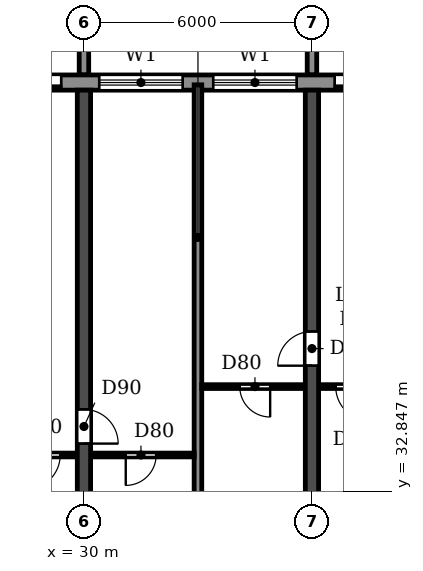
"""IFC4 building model, lengths in metres.
Left out: names, types, materials, properties, quantities, classifications, styles, units other than length and angle.
Written with IfcOpenShell. Run it as: python <this file> out.ifc"""

import sys

from ifc_helpers import new_model, si_unit, direction, frame, frame_2d, origin, place, context, subcontext, project, spatial, polyline, rectangle, outline, extrude, source, transform, mapped, element, fill, save


model = new_model("IFC4")
c1 = context("Model", 3, precision=1e-05, world=origin(), true_north=direction((0.0, 1.0)))
c2 = subcontext(c1, "Body", "Model", "MODEL_VIEW")
j1 = project(units=[si_unit("LENGTHUNIT", "METRE"), si_unit("PLANEANGLEUNIT", "RADIAN")], contexts=[c1])
p1 = place(None, origin())
s1 = spatial("IfcSite", under=j1, at=p1, CompositionType="ELEMENT")
p2 = place(p1, origin())
s2 = spatial("IfcBuilding", under=s1, at=p2, CompositionType="ELEMENT")
p3 = place(p2, frame((0.0, 0.0, 92.7)))
s3 = spatial("IfcBuildingStorey", under=s2, at=p3, CompositionType="ELEMENT", Elevation=92.7)
p4 = place(p3, frame((30.0, 30.525, 0.0), z_axis=(0.0, 0.0, 1.0), x_axis=(0.0, 1.0, 0.0)))
e1 = element("IfcWall", 1, at=p4, inside=s3, PredefinedType="SHEAR", context=c2, shape_type="SweptSolid", body=[
    extrude(rectangle(XDim=12.875, YDim=0.35, at=frame_2d((6.438, 0.0))), origin(), (0.0, 0.0, 1.0), 3.06),
])
p5 = place(p4, frame((3.575, 0.0, 0.0)))
e2 = element("IfcOpeningElement", 2, at=p5, cuts=e1, PredefinedType="OPENING", context=c2, shape_type="SweptSolid", body=[
    extrude(rectangle(XDim=0.9, YDim=2.1, at=frame_2d((0.45, 1.05))), frame((0.0, 0.185, 0.0), z_axis=(0.0, -1.0, 0.0), x_axis=(1.0, 0.0, 0.0)), (0.0, 0.0, 1.0), 0.37),
])
p6 = place(p3, frame((36.0, 30.525, 0.0), z_axis=(0.0, 0.0, 1.0), x_axis=(0.0, 1.0, 0.0)))
e3 = element("IfcWall", 3, at=p6, inside=s3, PredefinedType="SHEAR", context=c2, shape_type="SweptSolid", body=[
    extrude(rectangle(XDim=12.875, YDim=0.35, at=frame_2d((6.438, 0.0))), origin(), (0.0, 0.0, 1.0), 3.06),
])
p7 = place(p6, frame((5.625, 0.0, 0.0)))
e4 = element("IfcOpeningElement", 4, at=p7, cuts=e3, PredefinedType="OPENING", context=c2, shape_type="SweptSolid", body=[
    extrude(rectangle(XDim=0.9, YDim=2.1, at=frame_2d((0.45, 1.05))), frame((0.0, 0.185, 0.0), z_axis=(0.0, -1.0, 0.0), x_axis=(1.0, 0.0, 0.0)), (0.0, 0.0, 1.0), 0.37),
])
p8 = place(p3, frame((91.317, 43.6, 0.0), z_axis=(0.0, 0.0, 1.0), x_axis=(-1.0, 0.0, 0.0)))
e5 = element("IfcWall", 5, at=p8, inside=s3, PredefinedType="STANDARD", context=c2, shape_type="SweptSolid", body=[
    extrude(rectangle(XDim=80.634, YDim=0.4, at=frame_2d((40.317, 0.0))), origin(), (0.0, 0.0, 1.0), 3.06),
])
p9 = place(p8, frame((76.717, 0.0, 0.9)))
e6 = element("IfcOpeningElement", 6, at=p9, cuts=e5, PredefinedType="OPENING", context=c2, shape_type="SweptSolid", body=[
    extrude(rectangle(XDim=2.2, YDim=1.5, at=frame_2d((1.1, 0.75))), frame((0.0, 0.21, 0.0), z_axis=(0.0, -1.0, 0.0), x_axis=(1.0, 0.0, 0.0)), (0.0, 0.0, 1.0), 0.42),
])
p10 = place(p8, frame((73.917, 0.0, 0.0)))
e7 = element("IfcOpeningElement", 7, at=p10, cuts=e5, PredefinedType="OPENING", context=c2, shape_type="SweptSolid", body=[
    extrude(rectangle(XDim=1.8, YDim=2.4, at=frame_2d((0.9, 1.2))), frame((0.0, 0.21, 0.0), z_axis=(0.0, -1.0, 0.0), x_axis=(1.0, 0.0, 0.0)), (0.0, 0.0, 1.0), 0.42),
])
p11 = place(p8, frame((70.717, 0.0, 0.9)))
e8 = element("IfcOpeningElement", 8, at=p11, cuts=e5, PredefinedType="OPENING", context=c2, shape_type="SweptSolid", body=[
    extrude(rectangle(XDim=2.2, YDim=1.5, at=frame_2d((1.1, 0.75))), frame((0.0, 0.21, 0.0), z_axis=(0.0, -1.0, 0.0), x_axis=(1.0, 0.0, 0.0)), (0.0, 0.0, 1.0), 0.42),
])
p12 = place(p8, frame((67.717, 0.0, 0.9)))
e9 = element("IfcOpeningElement", 9, at=p12, cuts=e5, PredefinedType="OPENING", context=c2, shape_type="SweptSolid", body=[
    extrude(rectangle(XDim=2.2, YDim=1.5, at=frame_2d((1.1, 0.75))), frame((0.0, 0.21, 0.0), z_axis=(0.0, -1.0, 0.0), x_axis=(1.0, 0.0, 0.0)), (0.0, 0.0, 1.0), 0.42),
])
p13 = place(p8, frame((64.717, 0.0, 0.9)))
e10 = element("IfcOpeningElement", 10, at=p13, cuts=e5, PredefinedType="OPENING", context=c2, shape_type="SweptSolid", body=[
    extrude(rectangle(XDim=2.2, YDim=1.5, at=frame_2d((1.1, 0.75))), frame((0.0, 0.21, 0.0), z_axis=(0.0, -1.0, 0.0), x_axis=(1.0, 0.0, 0.0)), (0.0, 0.0, 1.0), 0.42),
])
p14 = place(p8, frame((61.917, 0.0, 0.0)))
e11 = element("IfcOpeningElement", 11, at=p14, cuts=e5, PredefinedType="OPENING", context=c2, shape_type="SweptSolid", body=[
    extrude(rectangle(XDim=1.8, YDim=2.4, at=frame_2d((0.9, 1.2))), frame((0.0, 0.21, 0.0), z_axis=(0.0, -1.0, 0.0), x_axis=(1.0, 0.0, 0.0)), (0.0, 0.0, 1.0), 0.42),
])
p15 = place(p8, frame((58.717, 0.0, 0.9)))
e12 = element("IfcOpeningElement", 12, at=p15, cuts=e5, PredefinedType="OPENING", context=c2, shape_type="SweptSolid", body=[
    extrude(rectangle(XDim=2.2, YDim=1.5, at=frame_2d((1.1, 0.75))), frame((0.0, 0.21, 0.0), z_axis=(0.0, -1.0, 0.0), x_axis=(1.0, 0.0, 0.0)), (0.0, 0.0, 1.0), 0.42),
])
p16 = place(p8, frame((55.717, 0.0, 0.9)))
e13 = element("IfcOpeningElement", 13, at=p16, cuts=e5, PredefinedType="OPENING", context=c2, shape_type="SweptSolid", body=[
    extrude(rectangle(XDim=2.2, YDim=1.5, at=frame_2d((1.1, 0.75))), frame((0.0, 0.21, 0.0), z_axis=(0.0, -1.0, 0.0), x_axis=(1.0, 0.0, 0.0)), (0.0, 0.0, 1.0), 0.42),
])
p17 = place(p8, frame((52.917, 0.0, 0.0)))
e14 = element("IfcOpeningElement", 14, at=p17, cuts=e5, PredefinedType="OPENING", context=c2, shape_type="SweptSolid", body=[
    extrude(rectangle(XDim=1.8, YDim=2.4, at=frame_2d((0.9, 1.2))), frame((0.0, 0.21, 0.0), z_axis=(0.0, -1.0, 0.0), x_axis=(1.0, 0.0, 0.0)), (0.0, 0.0, 1.0), 0.42),
])
p18 = place(p8, frame((49.717, 0.0, 0.9)))
e15 = element("IfcOpeningElement", 15, at=p18, cuts=e5, PredefinedType="OPENING", context=c2, shape_type="SweptSolid", body=[
    extrude(rectangle(XDim=2.2, YDim=1.5, at=frame_2d((1.1, 0.75))), frame((0.0, 0.21, 0.0), z_axis=(0.0, -1.0, 0.0), x_axis=(1.0, 0.0, 0.0)), (0.0, 0.0, 1.0), 0.42),
])
p19 = place(p8, frame((46.717, 0.0, 0.9)))
e16 = element("IfcOpeningElement", 16, at=p19, cuts=e5, PredefinedType="OPENING", context=c2, shape_type="SweptSolid", body=[
    extrude(rectangle(XDim=2.2, YDim=1.5, at=frame_2d((1.1, 0.75))), frame((0.0, 0.21, 0.0), z_axis=(0.0, -1.0, 0.0), x_axis=(1.0, 0.0, 0.0)), (0.0, 0.0, 1.0), 0.42),
])
p20 = place(p8, frame((43.717, 0.0, 0.9)))
e17 = element("IfcOpeningElement", 17, at=p20, cuts=e5, PredefinedType="OPENING", context=c2, shape_type="SweptSolid", body=[
    extrude(rectangle(XDim=2.2, YDim=1.5, at=frame_2d((1.1, 0.75))), frame((0.0, 0.21, 0.0), z_axis=(0.0, -1.0, 0.0), x_axis=(1.0, 0.0, 0.0)), (0.0, 0.0, 1.0), 0.42),
])
p21 = place(p8, frame((40.717, 0.0, 0.9)))
e18 = element("IfcOpeningElement", 18, at=p21, cuts=e5, PredefinedType="OPENING", context=c2, shape_type="SweptSolid", body=[
    extrude(rectangle(XDim=2.2, YDim=1.5, at=frame_2d((1.1, 0.75))), frame((0.0, 0.21, 0.0), z_axis=(0.0, -1.0, 0.0), x_axis=(1.0, 0.0, 0.0)), (0.0, 0.0, 1.0), 0.42),
])
p22 = place(p8, frame((37.917, 0.0, 0.0)))
e19 = element("IfcOpeningElement", 19, at=p22, cuts=e5, PredefinedType="OPENING", context=c2, shape_type="SweptSolid", body=[
    extrude(rectangle(XDim=1.8, YDim=2.4, at=frame_2d((0.9, 1.2))), frame((0.0, 0.21, 0.0), z_axis=(0.0, -1.0, 0.0), x_axis=(1.0, 0.0, 0.0)), (0.0, 0.0, 1.0), 0.42),
])
p23 = place(p8, frame((34.917, 0.0, 0.0)))
e20 = element("IfcOpeningElement", 20, at=p23, cuts=e5, PredefinedType="OPENING", context=c2, shape_type="SweptSolid", body=[
    extrude(rectangle(XDim=1.8, YDim=2.4, at=frame_2d((0.9, 1.2))), frame((0.0, 0.21, 0.0), z_axis=(0.0, -1.0, 0.0), x_axis=(1.0, 0.0, 0.0)), (0.0, 0.0, 1.0), 0.42),
])
p24 = place(p8, frame((31.717, 0.0, 0.9)))
e21 = element("IfcOpeningElement", 21, at=p24, cuts=e5, PredefinedType="OPENING", context=c2, shape_type="SweptSolid", body=[
    extrude(rectangle(XDim=2.2, YDim=1.5, at=frame_2d((1.1, 0.75))), frame((0.0, 0.21, 0.0), z_axis=(0.0, -1.0, 0.0), x_axis=(1.0, 0.0, 0.0)), (0.0, 0.0, 1.0), 0.42),
])
p25 = place(p8, frame((28.717, 0.0, 0.9)))
e22 = element("IfcOpeningElement", 22, at=p25, cuts=e5, PredefinedType="OPENING", context=c2, shape_type="SweptSolid", body=[
    extrude(rectangle(XDim=2.2, YDim=1.5, at=frame_2d((1.1, 0.75))), frame((0.0, 0.21, 0.0), z_axis=(0.0, -1.0, 0.0), x_axis=(1.0, 0.0, 0.0)), (0.0, 0.0, 1.0), 0.42),
])
p26 = place(p8, frame((25.717, 0.0, 0.9)))
e23 = element("IfcOpeningElement", 23, at=p26, cuts=e5, PredefinedType="OPENING", context=c2, shape_type="SweptSolid", body=[
    extrude(rectangle(XDim=2.2, YDim=1.5, at=frame_2d((1.1, 0.75))), frame((0.0, 0.21, 0.0), z_axis=(0.0, -1.0, 0.0), x_axis=(1.0, 0.0, 0.0)), (0.0, 0.0, 1.0), 0.42),
])
p27 = place(p8, frame((22.717, 0.0, 0.9)))
e24 = element("IfcOpeningElement", 24, at=p27, cuts=e5, PredefinedType="OPENING", context=c2, shape_type="SweptSolid", body=[
    extrude(rectangle(XDim=2.2, YDim=1.5, at=frame_2d((1.1, 0.75))), frame((0.0, 0.21, 0.0), z_axis=(0.0, -1.0, 0.0), x_axis=(1.0, 0.0, 0.0)), (0.0, 0.0, 1.0), 0.42),
])
p28 = place(p8, frame((19.917, 0.0, 0.0)))
e25 = element("IfcOpeningElement", 25, at=p28, cuts=e5, PredefinedType="OPENING", context=c2, shape_type="SweptSolid", body=[
    extrude(rectangle(XDim=1.8, YDim=2.4, at=frame_2d((0.9, 1.2))), frame((0.0, 0.21, 0.0), z_axis=(0.0, -1.0, 0.0), x_axis=(1.0, 0.0, 0.0)), (0.0, 0.0, 1.0), 0.42),
])
p29 = place(p8, frame((16.717, 0.0, 0.9)))
e26 = element("IfcOpeningElement", 26, at=p29, cuts=e5, PredefinedType="OPENING", context=c2, shape_type="SweptSolid", body=[
    extrude(rectangle(XDim=2.2, YDim=1.5, at=frame_2d((1.1, 0.75))), frame((0.0, 0.21, 0.0), z_axis=(0.0, -1.0, 0.0), x_axis=(1.0, 0.0, 0.0)), (0.0, 0.0, 1.0), 0.42),
])
p30 = place(p8, frame((13.917, 0.0, 0.0)))
e27 = element("IfcOpeningElement", 27, at=p30, cuts=e5, PredefinedType="OPENING", context=c2, shape_type="SweptSolid", body=[
    extrude(rectangle(XDim=1.8, YDim=2.4, at=frame_2d((0.9, 1.2))), frame((0.0, 0.21, 0.0), z_axis=(0.0, -1.0, 0.0), x_axis=(1.0, 0.0, 0.0)), (0.0, 0.0, 1.0), 0.42),
])
p31 = place(p8, frame((10.717, 0.0, 0.9)))
e28 = element("IfcOpeningElement", 28, at=p31, cuts=e5, PredefinedType="OPENING", context=c2, shape_type="SweptSolid", body=[
    extrude(rectangle(XDim=2.2, YDim=1.5, at=frame_2d((1.1, 0.75))), frame((0.0, 0.21, 0.0), z_axis=(0.0, -1.0, 0.0), x_axis=(1.0, 0.0, 0.0)), (0.0, 0.0, 1.0), 0.42),
])
p32 = place(p8, frame((7.917, 0.0, 0.0)))
e29 = element("IfcOpeningElement", 29, at=p32, cuts=e5, PredefinedType="OPENING", context=c2, shape_type="SweptSolid", body=[
    extrude(rectangle(XDim=1.8, YDim=2.4, at=frame_2d((0.9, 1.2))), frame((0.0, 0.21, 0.0), z_axis=(0.0, -1.0, 0.0), x_axis=(1.0, 0.0, 0.0)), (0.0, 0.0, 1.0), 0.42),
])
p33 = place(p8, frame((4.717, 0.0, 0.9)))
e30 = element("IfcOpeningElement", 30, at=p33, cuts=e5, PredefinedType="OPENING", context=c2, shape_type="SweptSolid", body=[
    extrude(rectangle(XDim=2.2, YDim=1.5, at=frame_2d((1.1, 0.75))), frame((0.0, 0.21, 0.0), z_axis=(0.0, -1.0, 0.0), x_axis=(1.0, 0.0, 0.0)), (0.0, 0.0, 1.0), 0.42),
])
p34 = place(p8, frame((1.917, 0.0, 0.0)))
e31 = element("IfcOpeningElement", 31, at=p34, cuts=e5, PredefinedType="OPENING", context=c2, shape_type="SweptSolid", body=[
    extrude(rectangle(XDim=1.8, YDim=2.4, at=frame_2d((0.9, 1.2))), frame((0.0, 0.21, 0.0), z_axis=(0.0, -1.0, 0.0), x_axis=(1.0, 0.0, 0.0)), (0.0, 0.0, 1.0), 0.42),
])
m1 = source(origin(), c2, "Body", "SweptSolid", [
    extrude(outline(polyline([(0.0, 0.0), (0.25, 0.0), (0.25, 3.1), (0.0, 3.1), (0.0, 0.0)])), origin(), (0.0, 0.0, 1.0), 3.1),
])
for number, where in (
    (32, (29.875, 43.8, 0.0)),
    (33, (35.875, 43.8, 0.0)),
):
    element("IfcWall", number, at=place(p3, frame(where)), inside=s3, PredefinedType="STANDARD", context=c2, shape_type="MappedRepresentation", body=[
        mapped(m1, transform((0.0, 0.0, 0.0))),
    ])
p35 = place(p3, frame((33.0, 30.535, 0.0), z_axis=(0.0, 0.0, 1.0), x_axis=(0.0, 1.0, 0.0)))
e34 = element("IfcWall", 34, at=p35, inside=s3, PredefinedType="PARTITIONING", context=c2, shape_type="SweptSolid", body=[
    extrude(rectangle(XDim=13.005, YDim=0.2, at=frame_2d((6.502, 0.0))), origin(), (0.0, 0.0, 1.0), 3.06),
])
p36 = place(p3, frame((27.8, 33.8, 0.0), z_axis=(0.0, 0.0, 1.0), x_axis=(1.0, 0.0, 0.0)))
e35 = element("IfcWall", 35, at=p36, inside=s3, PredefinedType="PARTITIONING", context=c2, shape_type="SweptSolid", body=[
    extrude(rectangle(XDim=2.015, YDim=0.1, at=frame_2d((1.007, 0.0))), origin(), (0.0, 0.0, 1.0), 3.06),
])
p37 = place(p36, frame((0.675, 0.0, 0.0)))
e36 = element("IfcOpeningElement", 36, at=p37, cuts=e35, PredefinedType="OPENING", context=c2, shape_type="SweptSolid", body=[
    extrude(rectangle(XDim=0.9, YDim=2.1, at=frame_2d((0.45, 1.05))), frame((0.0, 0.06, 0.0), z_axis=(0.0, -1.0, 0.0), x_axis=(1.0, 0.0, 0.0)), (0.0, 0.0, 1.0), 0.12),
])
p38 = place(p3, frame((30.185, 33.8, 0.0), z_axis=(0.0, 0.0, 1.0), x_axis=(1.0, 0.0, 0.0)))
e37 = element("IfcWall", 37, at=p38, inside=s3, PredefinedType="PARTITIONING", context=c2, shape_type="SweptSolid", body=[
    extrude(rectangle(XDim=2.715, YDim=0.1, at=frame_2d((1.357, 0.0))), origin(), (0.0, 0.0, 1.0), 3.06),
])
p39 = place(p38, frame((0.915, 0.0, 0.0)))
e38 = element("IfcOpeningElement", 38, at=p39, cuts=e37, PredefinedType="OPENING", context=c2, shape_type="SweptSolid", body=[
    extrude(rectangle(XDim=0.8, YDim=2.1, at=frame_2d((0.4, 1.05))), frame((0.0, 0.06, 0.0), z_axis=(0.0, -1.0, 0.0), x_axis=(1.0, 0.0, 0.0)), (0.0, 0.0, 1.0), 0.12),
])
p40 = place(p3, frame((33.1, 35.6, 0.0), z_axis=(0.0, 0.0, 1.0), x_axis=(1.0, 0.0, 0.0)))
e39 = element("IfcWall", 39, at=p40, inside=s3, PredefinedType="PARTITIONING", context=c2, shape_type="SweptSolid", body=[
    extrude(rectangle(XDim=2.715, YDim=0.1, at=frame_2d((1.357, 0.0))), origin(), (0.0, 0.0, 1.0), 3.06),
])
p41 = place(p40, frame((1.0, 0.0, 0.0)))
e40 = element("IfcOpeningElement", 40, at=p41, cuts=e39, PredefinedType="OPENING", context=c2, shape_type="SweptSolid", body=[
    extrude(rectangle(XDim=0.8, YDim=2.1, at=frame_2d((0.4, 1.05))), frame((0.0, 0.06, 0.0), z_axis=(0.0, -1.0, 0.0), x_axis=(1.0, 0.0, 0.0)), (0.0, 0.0, 1.0), 0.12),
])
p42 = place(p3, frame((36.185, 35.6, 0.0), z_axis=(0.0, 0.0, 1.0), x_axis=(1.0, 0.0, 0.0)))
e41 = element("IfcWall", 41, at=p42, inside=s3, PredefinedType="PARTITIONING", context=c2, shape_type="SweptSolid", body=[
    extrude(rectangle(XDim=2.015, YDim=0.1, at=frame_2d((1.007, 0.0))), origin(), (0.0, 0.0, 1.0), 3.06),
])
p43 = place(p42, frame((0.44, 0.0, 0.0)))
e42 = element("IfcOpeningElement", 42, at=p43, cuts=e41, PredefinedType="OPENING", context=c2, shape_type="SweptSolid", body=[
    extrude(rectangle(XDim=0.9, YDim=2.1, at=frame_2d((0.45, 1.05))), frame((0.0, 0.06, 0.0), z_axis=(0.0, -1.0, 0.0), x_axis=(1.0, 0.0, 0.0)), (0.0, 0.0, 1.0), 0.12),
])
p44 = place(p14, origin())
e43 = element("IfcDoor", 43, at=p44, inside=s3, OperationType="DOUBLE_DOOR_SLIDING", PredefinedType="DOOR", context=c2, shape_type="SweptSolid", body=[
    extrude(rectangle(XDim=1.8, YDim=2.4, at=frame_2d((0.9, 1.2))), frame((0.0, 0.025, 0.0), z_axis=(0.0, -1.0, 0.0), x_axis=(1.0, 0.0, 0.0)), (0.0, 0.0, 1.0), 0.05),
])
fill(e11, e43)
p45 = place(p15, origin())
e44 = element("IfcWindow", 44, at=p45, inside=s3, PartitioningType="DOUBLE_PANEL_HORIZONTAL", PredefinedType="WINDOW", context=c2, shape_type="SweptSolid", body=[
    extrude(rectangle(XDim=2.2, YDim=1.5, at=frame_2d((1.1, 0.75))), frame((0.0, 0.03, 0.0), z_axis=(0.0, -1.0, 0.0), x_axis=(1.0, 0.0, 0.0)), (0.0, 0.0, 1.0), 0.06),
])
fill(e12, e44)
p46 = place(p16, origin())
e45 = element("IfcWindow", 45, at=p46, inside=s3, PartitioningType="DOUBLE_PANEL_HORIZONTAL", PredefinedType="WINDOW", context=c2, shape_type="SweptSolid", body=[
    extrude(rectangle(XDim=2.2, YDim=1.5, at=frame_2d((1.1, 0.75))), frame((0.0, 0.03, 0.0), z_axis=(0.0, -1.0, 0.0), x_axis=(1.0, 0.0, 0.0)), (0.0, 0.0, 1.0), 0.06),
])
fill(e13, e45)
p47 = place(p17, origin())
e46 = element("IfcDoor", 46, at=p47, inside=s3, OperationType="DOUBLE_DOOR_SLIDING", PredefinedType="DOOR", context=c2, shape_type="SweptSolid", body=[
    extrude(rectangle(XDim=1.8, YDim=2.4, at=frame_2d((0.9, 1.2))), frame((0.0, 0.025, 0.0), z_axis=(0.0, -1.0, 0.0), x_axis=(1.0, 0.0, 0.0)), (0.0, 0.0, 1.0), 0.05),
])
fill(e14, e46)
p48 = place(p39, frame((0.8, 0.0, 0.0), z_axis=(0.0, 0.0, 1.0), x_axis=(-1.0, 0.0, 0.0)))
e47 = element("IfcDoor", 47, at=p48, inside=s3, OperationType="SINGLE_SWING_RIGHT", PredefinedType="DOOR", context=c2, shape_type="SweptSolid", body=[
    extrude(rectangle(XDim=0.8, YDim=2.1, at=frame_2d((0.4, 1.05))), frame((0.0, 0.025, 0.0), z_axis=(0.0, -1.0, 0.0), x_axis=(1.0, 0.0, 0.0)), (0.0, 0.0, 1.0), 0.05),
])
fill(e38, e47)
p49 = place(p37, frame((0.9, 0.0, 0.0), z_axis=(0.0, 0.0, 1.0), x_axis=(-1.0, 0.0, 0.0)))
e48 = element("IfcDoor", 48, at=p49, inside=s3, OperationType="SINGLE_SWING_RIGHT", PredefinedType="DOOR", context=c2, shape_type="SweptSolid", body=[
    extrude(rectangle(XDim=0.9, YDim=2.1, at=frame_2d((0.45, 1.05))), frame((0.0, 0.025, 0.0), z_axis=(0.0, -1.0, 0.0), x_axis=(1.0, 0.0, 0.0)), (0.0, 0.0, 1.0), 0.05),
])
fill(e36, e48)
p50 = place(p5, frame((0.9, 0.0, 0.0), z_axis=(0.0, 0.0, 1.0), x_axis=(-1.0, 0.0, 0.0)))
e49 = element("IfcDoor", 49, at=p50, inside=s3, OperationType="SINGLE_SWING_RIGHT", PredefinedType="DOOR", context=c2, shape_type="SweptSolid", body=[
    extrude(rectangle(XDim=0.9, YDim=2.1, at=frame_2d((0.45, 1.05))), frame((0.0, 0.025, 0.0), z_axis=(0.0, -1.0, 0.0), x_axis=(1.0, 0.0, 0.0)), (0.0, 0.0, 1.0), 0.05),
])
fill(e2, e49)
p51 = place(p41, frame((0.8, 0.0, 0.0), z_axis=(0.0, 0.0, 1.0), x_axis=(-1.0, 0.0, 0.0)))
e50 = element("IfcDoor", 50, at=p51, inside=s3, OperationType="SINGLE_SWING_LEFT", PredefinedType="DOOR", context=c2, shape_type="SweptSolid", body=[
    extrude(rectangle(XDim=0.8, YDim=2.1, at=frame_2d((0.4, 1.05))), frame((0.0, 0.025, 0.0), z_axis=(0.0, -1.0, 0.0), x_axis=(1.0, 0.0, 0.0)), (0.0, 0.0, 1.0), 0.05),
])
fill(e40, e50)
p52 = place(p7, origin())
e51 = element("IfcDoor", 51, at=p52, inside=s3, OperationType="SINGLE_SWING_LEFT", PredefinedType="DOOR", context=c2, shape_type="SweptSolid", body=[
    extrude(rectangle(XDim=0.9, YDim=2.1, at=frame_2d((0.45, 1.05))), frame((0.0, 0.025, 0.0), z_axis=(0.0, -1.0, 0.0), x_axis=(1.0, 0.0, 0.0)), (0.0, 0.0, 1.0), 0.05),
])
fill(e4, e51)
p53 = place(p43, frame((0.9, 0.0, 0.0), z_axis=(0.0, 0.0, 1.0), x_axis=(-1.0, 0.0, 0.0)))
e52 = element("IfcDoor", 52, at=p53, inside=s3, OperationType="SINGLE_SWING_LEFT", PredefinedType="DOOR", context=c2, shape_type="SweptSolid", body=[
    extrude(rectangle(XDim=0.9, YDim=2.1, at=frame_2d((0.45, 1.05))), frame((0.0, 0.025, 0.0), z_axis=(0.0, -1.0, 0.0), x_axis=(1.0, 0.0, 0.0)), (0.0, 0.0, 1.0), 0.05),
])
fill(e42, e52)
save(model, sys.argv[1])
